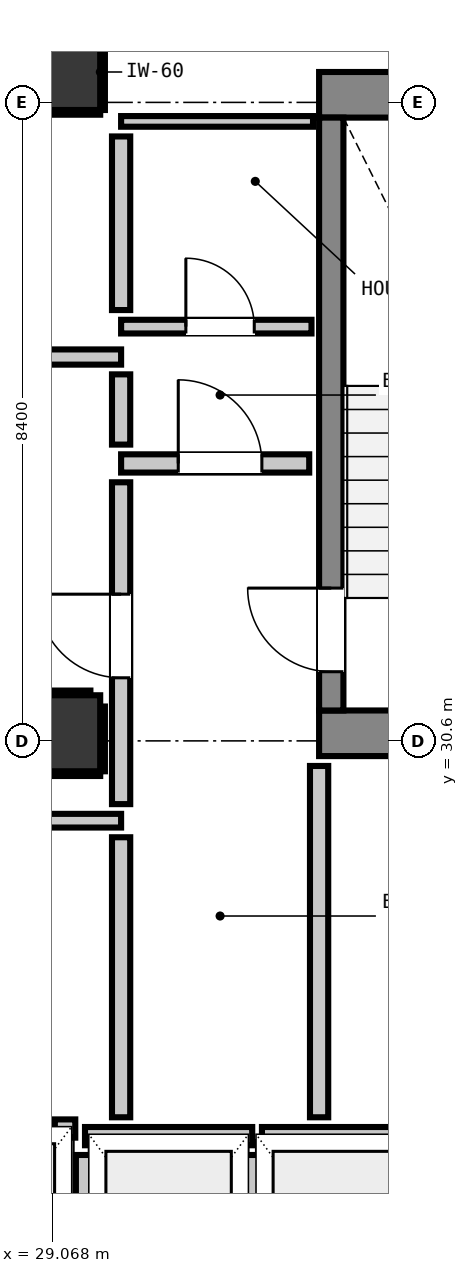
"""IFC4 building model, lengths in metres.
Left out: names, types, materials, properties, quantities, classifications, styles, units other than length and angle.
Written with IfcOpenShell. Run it as: python <this file> out.ifc"""

import sys

from ifc_helpers import new_model, si_unit, direction, frame, frame_2d, origin, origin_2d, place, context, subcontext, project, spatial, rectangle, extrude, element, fill, save


model = new_model("IFC4")
c1 = context("Model", 3, precision=1e-05, world=origin(), true_north=direction((0.0, 1.0)))
c2 = subcontext(c1, "Body", "Model", "MODEL_VIEW")
j1 = project(units=[si_unit("LENGTHUNIT", "METRE"), si_unit("PLANEANGLEUNIT", "RADIAN")], contexts=[c1])
p1 = place(None, origin())
s1 = spatial("IfcSite", under=j1, at=p1, CompositionType="ELEMENT")
p2 = place(p1, origin())
s2 = spatial("IfcBuilding", under=s1, at=p2, CompositionType="ELEMENT")
p3 = place(p2, frame((0.0, 0.0, 78.44)))
s3 = spatial("IfcBuildingStorey", under=s2, at=p3, CompositionType="ELEMENT", Elevation=78.44)
p4 = place(p3, frame((29.2, 39.4, 0.0), z_axis=(0.0, 0.0, 1.0), x_axis=(1.0, 0.0, 0.0)))
e1 = element("IfcColumn", 1, at=p4, inside=s3, PredefinedType="COLUMN", context=c2, shape_type="SweptSolid", body=[
    extrude(rectangle(XDim=1.0, YDim=1.0, at=origin_2d()), origin(), (0.0, 0.0, 1.0), 3.32),
])
p5 = place(p3, frame((32.58, 39.1, 0.0), z_axis=(0.0, 0.0, 1.0), x_axis=(1.0, 0.0, 0.0)))
e2 = element("IfcWall", 2, at=p5, inside=s3, PredefinedType="SHEAR", context=c2, shape_type="SweptSolid", body=[
    extrude(rectangle(XDim=4.08, YDim=0.6, at=frame_2d((2.04, 0.0))), origin(), (0.0, 0.0, 1.0), 3.32),
])
p6 = place(p3, frame((32.58, 30.7, 0.0), z_axis=(0.0, 0.0, 1.0), x_axis=(1.0, 0.0, 0.0)))
e3 = element("IfcWall", 3, at=p6, inside=s3, PredefinedType="SHEAR", context=c2, shape_type="SweptSolid", body=[
    extrude(rectangle(XDim=3.415, YDim=0.6, at=frame_2d((1.708, 0.0))), origin(), (0.0, 0.0, 1.0), 3.32),
])
p7 = place(p3, frame((32.74, 31.0, 0.0), z_axis=(0.0, 0.0, 1.0), x_axis=(0.0, 1.0, 0.0)))
e4 = element("IfcWall", 4, at=p7, inside=s3, PredefinedType="SHEAR", context=c2, shape_type="SweptSolid", body=[
    extrude(rectangle(XDim=7.8, YDim=0.32, at=frame_2d((3.9, 0.0))), origin(), (0.0, 0.0, 1.0), 3.32),
])
p8 = place(p7, frame((0.51, 0.0, 0.0)))
e5 = element("IfcOpeningElement", 5, at=p8, cuts=e4, PredefinedType="OPENING", context=c2, shape_type="SweptSolid", body=[
    extrude(rectangle(XDim=1.1, YDim=2.15, at=frame_2d((0.55, 1.075))), frame((0.0, 0.17, 0.0), z_axis=(0.0, -1.0, 0.0), x_axis=(1.0, 0.0, 0.0)), (0.0, 0.0, 1.0), 0.34),
])
p9 = place(p3, frame((29.2, 30.7, 0.0), z_axis=(0.0, 0.0, 1.0), x_axis=(1.0, 0.0, 0.0)))
e6 = element("IfcColumn", 6, at=p9, inside=s3, PredefinedType="COLUMN", context=c2, shape_type="SweptSolid", body=[
    extrude(rectangle(XDim=1.0, YDim=1.0, at=origin_2d()), origin(), (0.0, 0.0, 1.0), 3.32),
])
p10 = place(p3, frame((29.5, 25.4, 0.0), z_axis=(0.0, 0.0, 1.0), x_axis=(1.0, 0.0, 0.0)))
e7 = element("IfcWall", 7, at=p10, inside=s3, PredefinedType="PARTITIONING", context=c2, shape_type="SweptSolid", body=[
    extrude(rectangle(XDim=2.2, YDim=0.24, at=frame_2d((1.1, 0.0))), origin(), (0.0, 0.0, 1.0), 2.9),
])
p11 = place(p3, frame((29.5, 22.632, 0.0), z_axis=(0.0, 0.0, 1.0), x_axis=(0.0, 1.0, 0.0)))
e8 = element("IfcWall", 8, at=p11, inside=s3, PredefinedType="PARTITIONING", context=c2, shape_type="SweptSolid", body=[
    extrude(rectangle(XDim=2.52, YDim=0.24, at=frame_2d((1.26, 0.0))), origin(), (0.0, 0.0, 1.0), 0.905),
])
p12 = place(p3, frame((31.7, 22.73, 0.0), z_axis=(0.0, 0.0, 1.0), x_axis=(0.0, 1.0, 0.0)))
e9 = element("IfcWall", 9, at=p12, inside=s3, PredefinedType="PARTITIONING", context=c2, shape_type="SweptSolid", body=[
    extrude(rectangle(XDim=2.422, YDim=0.24, at=frame_2d((1.211, 0.0))), origin(), (0.0, 0.0, 1.0), 2.9),
])
p13 = place(p3, frame((31.828, 25.4, 0.0), z_axis=(0.0, 0.0, 1.0), x_axis=(1.0, 0.0, 0.0)))
e10 = element("IfcWall", 10, at=p13, inside=s3, PredefinedType="PARTITIONING", context=c2, shape_type="SweptSolid", body=[
    extrude(rectangle(XDim=2.072, YDim=0.24, at=frame_2d((1.036, 0.0))), origin(), (0.0, 0.0, 1.0), 2.9),
])
p14 = place(p3, frame((29.103, 25.5, 0.0), z_axis=(0.0, 0.0, 1.0), x_axis=(1.0, 0.0, 0.0)))
e11 = element("IfcWall", 11, at=p14, inside=s3, PredefinedType="PARTITIONING", context=c2, shape_type="SweptSolid", body=[
    extrude(rectangle(XDim=0.269, YDim=0.24, at=frame_2d((0.135, 0.0))), origin(), (0.0, 0.0, 1.0), 2.9),
])
p15 = place(p3, frame((29.975, 34.25, 0.0), z_axis=(0.0, 0.0, 1.0), x_axis=(1.0, 0.0, 0.0)))
e12 = element("IfcWall", 12, at=p15, inside=s3, PredefinedType="PARTITIONING", context=c2, shape_type="SweptSolid", body=[
    extrude(rectangle(XDim=2.475, YDim=0.24, at=frame_2d((1.237, 0.0))), origin(), (0.0, 0.0, 1.0), 2.9),
])
p16 = place(p15, frame((0.752, 0.0, 0.0)))
e13 = element("IfcOpeningElement", 13, at=p16, cuts=e12, PredefinedType="OPENING", context=c2, shape_type="SweptSolid", body=[
    extrude(rectangle(XDim=1.1, YDim=2.15, at=frame_2d((0.55, 1.075))), frame((0.0, 0.13, 0.0), z_axis=(0.0, -1.0, 0.0), x_axis=(1.0, 0.0, 0.0)), (0.0, 0.0, 1.0), 0.26),
])
p17 = place(p3, frame((28.604, 35.65, 0.0), z_axis=(0.0, 0.0, 1.0), x_axis=(1.0, 0.0, 0.0)))
e14 = element("IfcWall", 14, at=p17, inside=s3, PredefinedType="PARTITIONING", context=c2, shape_type="SweptSolid", body=[
    extrude(rectangle(XDim=1.371, YDim=0.2, at=frame_2d((0.686, 0.0))), origin(), (0.0, 0.0, 1.0), 2.9),
])
p18 = place(p3, frame((20.65, 29.55, 0.0), z_axis=(0.0, 0.0, 1.0), x_axis=(1.0, 0.0, 0.0)))
e15 = element("IfcWall", 15, at=p18, inside=s3, PredefinedType="PARTITIONING", context=c2, shape_type="SweptSolid", body=[
    extrude(rectangle(XDim=9.325, YDim=0.18, at=frame_2d((4.663, 0.0))), origin(), (0.0, 0.0, 1.0), 2.9),
])
p19 = place(p3, frame((29.975, 36.05, 0.0), z_axis=(0.0, 0.0, 1.0), x_axis=(1.0, 0.0, 0.0)))
e16 = element("IfcWall", 16, at=p19, inside=s3, PredefinedType="PARTITIONING", context=c2, shape_type="SweptSolid", body=[
    extrude(rectangle(XDim=2.505, YDim=0.18, at=frame_2d((1.252, 0.0))), origin(), (0.0, 0.0, 1.0), 2.9),
])
p20 = place(p19, frame((0.852, 0.0, 0.0)))
e17 = element("IfcOpeningElement", 17, at=p20, cuts=e16, PredefinedType="OPENING", context=c2, shape_type="SweptSolid", body=[
    extrude(rectangle(XDim=0.9, YDim=2.1, at=frame_2d((0.45, 1.05))), frame((0.0, 0.1, 0.0), z_axis=(0.0, -1.0, 0.0), x_axis=(1.0, 0.0, 0.0)), (0.0, 0.0, 1.0), 0.2),
])
p21 = place(p3, frame((29.975, 38.75, 0.0), z_axis=(0.0, 0.0, 1.0), x_axis=(1.0, 0.0, 0.0)))
e18 = element("IfcWall", 18, at=p21, inside=s3, PredefinedType="PARTITIONING", context=c2, shape_type="SweptSolid", body=[
    extrude(rectangle(XDim=2.525, YDim=0.14, at=frame_2d((1.262, 0.0))), origin(), (0.0, 0.0, 1.0), 0.905),
])
p22 = place(p3, frame((29.975, 25.648, 0.0), z_axis=(0.0, 0.0, 1.0), x_axis=(0.0, 1.0, 0.0)))
e19 = element("IfcWall", 19, at=p22, inside=s3, PredefinedType="PARTITIONING", context=c2, shape_type="SweptSolid", body=[
    extrude(rectangle(XDim=3.684, YDim=0.24, at=frame_2d((1.842, 0.0))), origin(), (0.0, 0.0, 1.0), 2.9),
])
p23 = place(p3, frame((29.975, 29.768, 0.0), z_axis=(0.0, 0.0, 1.0), x_axis=(0.0, 1.0, 0.0)))
e20 = element("IfcWall", 20, at=p23, inside=s3, PredefinedType="PARTITIONING", context=c2, shape_type="SweptSolid", body=[
    extrude(rectangle(XDim=4.234, YDim=0.24, at=frame_2d((2.117, 0.0))), origin(), (0.0, 0.0, 1.0), 2.9),
])
p24 = place(p23, frame((1.662, 0.0, 0.0)))
e21 = element("IfcOpeningElement", 21, at=p24, cuts=e20, PredefinedType="OPENING", context=c2, shape_type="SweptSolid", body=[
    extrude(rectangle(XDim=1.1, YDim=2.15, at=frame_2d((0.55, 1.075))), frame((0.0, 0.13, 0.0), z_axis=(0.0, -1.0, 0.0), x_axis=(1.0, 0.0, 0.0)), (0.0, 0.0, 1.0), 0.26),
])
p25 = place(p3, frame((29.975, 34.498, 0.0), z_axis=(0.0, 0.0, 1.0), x_axis=(0.0, 1.0, 0.0)))
e22 = element("IfcWall", 22, at=p25, inside=s3, PredefinedType="PARTITIONING", context=c2, shape_type="SweptSolid", body=[
    extrude(rectangle(XDim=0.924, YDim=0.24, at=frame_2d((0.462, 0.0))), origin(), (0.0, 0.0, 1.0), 2.9),
])
p26 = place(p3, frame((29.975, 36.268, 0.0), z_axis=(0.0, 0.0, 1.0), x_axis=(0.0, 1.0, 0.0)))
e23 = element("IfcWall", 23, at=p26, inside=s3, PredefinedType="PARTITIONING", context=c2, shape_type="SweptSolid", body=[
    extrude(rectangle(XDim=2.284, YDim=0.24, at=frame_2d((1.142, 0.0))), origin(), (0.0, 0.0, 1.0), 2.9),
])
p27 = place(p3, frame((32.58, 25.648, 0.0), z_axis=(0.0, 0.0, 1.0), x_axis=(0.0, 1.0, 0.0)))
e24 = element("IfcWall", 24, at=p27, inside=s3, PredefinedType="PARTITIONING", context=c2, shape_type="SweptSolid", body=[
    extrude(rectangle(XDim=4.622, YDim=0.24, at=frame_2d((2.311, 0.0))), origin(), (0.0, 0.0, 1.0), 2.9),
])
p28 = place(p3, frame((28.71, 38.868, 0.0), z_axis=(0.0, 0.0, 1.0), x_axis=(1.0, 0.0, 0.0)))
e25 = element("IfcWall", 25, at=p28, inside=s3, PredefinedType="PARTITIONING", context=c2, shape_type="SweptSolid", body=[
    extrude(rectangle(XDim=0.99, YDim=0.06, at=frame_2d((0.495, 0.0))), origin(), (0.0, 0.0, 1.0), 0.905),
])
for number, where, z_axis, x_axis in (
    (26, (29.732, 38.9, 0.0), (0.0, 0.0, 1.0), (0.0, 1.0, 0.0)),
    (27, (28.7, 30.168, 0.0), (0.0, 0.0, 1.0), (1.0, 0.0, 0.0)),
):
    element("IfcWall", number, at=place(p3, frame(where, z_axis=z_axis, x_axis=x_axis)), inside=s3, PredefinedType="PARTITIONING", context=c2, shape_type="SweptSolid", body=[
        extrude(rectangle(XDim=1.0, YDim=0.06, at=frame_2d((0.5, 0.0))), origin(), (0.0, 0.0, 1.0), 0.905),
    ])
p29 = place(p3, frame((28.7, 31.232, 0.0), z_axis=(0.0, 0.0, 1.0), x_axis=(1.0, 0.0, 0.0)))
e28 = element("IfcWall", 28, at=p29, inside=s3, PredefinedType="PARTITIONING", context=c2, shape_type="SweptSolid", body=[
    extrude(rectangle(XDim=0.871, YDim=0.06, at=frame_2d((0.436, 0.0))), origin(), (0.0, 0.0, 1.0), 0.905),
])
p30 = place(p3, frame((29.732, 30.2, 0.0), z_axis=(0.0, 0.0, 1.0), x_axis=(0.0, 1.0, 0.0)))
e29 = element("IfcWall", 29, at=p30, inside=s3, PredefinedType="PARTITIONING", context=c2, shape_type="SweptSolid", body=[
    extrude(rectangle(XDim=0.852, YDim=0.06, at=frame_2d((0.426, 0.0))), origin(), (0.0, 0.0, 1.0), 0.905),
])
p31 = place(p8, origin())
e30 = element("IfcDoor", 30, at=p31, inside=s3, OperationType="SINGLE_SWING_RIGHT", PredefinedType="DOOR", context=c2, shape_type="SweptSolid", body=[
    extrude(rectangle(XDim=1.1, YDim=2.15, at=frame_2d((0.55, 1.075))), frame((0.0, 0.025, 0.0), z_axis=(0.0, -1.0, 0.0), x_axis=(1.0, 0.0, 0.0)), (0.0, 0.0, 1.0), 0.05),
])
fill(e5, e30)
p32 = place(p24, origin())
e31 = element("IfcDoor", 31, at=p32, inside=s3, OperationType="SINGLE_SWING_RIGHT", PredefinedType="DOOR", context=c2, shape_type="SweptSolid", body=[
    extrude(rectangle(XDim=1.1, YDim=2.15, at=frame_2d((0.55, 1.075))), frame((0.0, 0.025, 0.0), z_axis=(0.0, -1.0, 0.0), x_axis=(1.0, 0.0, 0.0)), (0.0, 0.0, 1.0), 0.05),
])
fill(e21, e31)
p33 = place(p16, origin())
e32 = element("IfcDoor", 32, at=p33, inside=s3, OperationType="SINGLE_SWING_LEFT", PredefinedType="DOOR", context=c2, shape_type="SweptSolid", body=[
    extrude(rectangle(XDim=1.1, YDim=2.15, at=frame_2d((0.55, 1.075))), frame((0.0, 0.025, 0.0), z_axis=(0.0, -1.0, 0.0), x_axis=(1.0, 0.0, 0.0)), (0.0, 0.0, 1.0), 0.05),
])
fill(e13, e32)
p34 = place(p20, origin())
e33 = element("IfcDoor", 33, at=p34, inside=s3, OperationType="SINGLE_SWING_LEFT", PredefinedType="DOOR", context=c2, shape_type="SweptSolid", body=[
    extrude(rectangle(XDim=0.9, YDim=2.1, at=frame_2d((0.45, 1.05))), frame((0.0, 0.025, 0.0), z_axis=(0.0, -1.0, 0.0), x_axis=(1.0, 0.0, 0.0)), (0.0, 0.0, 1.0), 0.05),
])
fill(e17, e33)
save(model, sys.argv[1])
